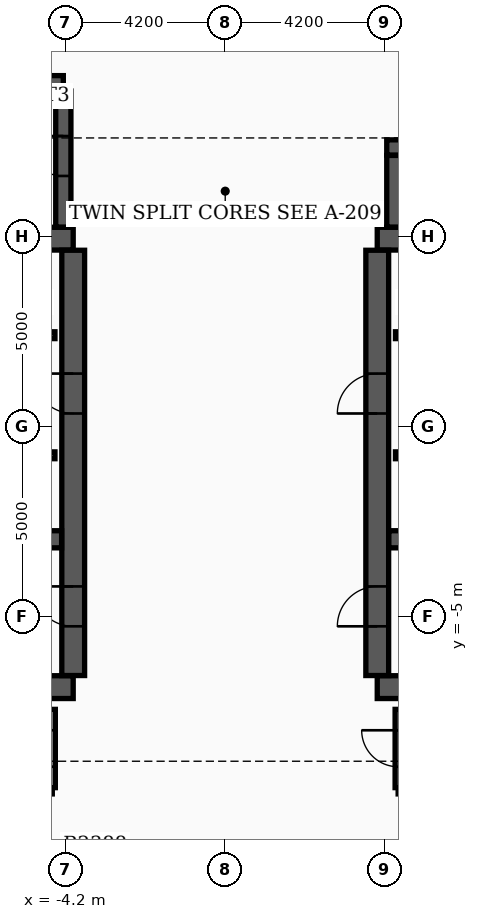
"""IFC4 building model, lengths in metres.
Left out: names, types, materials, properties, quantities, classifications, styles, units other than length and angle.
Written with IfcOpenShell. Run it as: python <this file> out.ifc"""

import sys

from ifc_helpers import new_model, si_unit, direction, frame, frame_2d, origin, place, context, subcontext, project, spatial, rectangle, extrude, element, fill, save


model = new_model("IFC4")
c1 = context("Model", 3, precision=1e-05, world=origin(), true_north=direction((0.0, 1.0)))
c2 = subcontext(c1, "Body", "Model", "MODEL_VIEW")
j1 = project(units=[si_unit("LENGTHUNIT", "METRE"), si_unit("PLANEANGLEUNIT", "RADIAN")], contexts=[c1])
p1 = place(None, origin())
s1 = spatial("IfcSite", under=j1, at=p1, CompositionType="ELEMENT")
p2 = place(p1, origin())
s2 = spatial("IfcBuilding", under=s1, at=p2, CompositionType="ELEMENT")
p3 = place(p2, frame((0.0, 0.0, 152.7)))
s3 = spatial("IfcBuildingStorey", under=s2, at=p3, CompositionType="ELEMENT", Elevation=152.7)
for number, where, z_axis, x_axis in (
    (1, (-12.4, -6.85, 0.0), (0.0, 0.0, 1.0), (1.0, 0.0, 0.0)),
    (2, (-12.4, 4.95, 0.0), (0.0, 0.0, 1.0), (1.0, 0.0, 0.0)),
):
    element("IfcWall", number, at=place(p3, frame(where, z_axis=z_axis, x_axis=x_axis)), inside=s3, PredefinedType="SHEAR", context=c2, shape_type="SweptSolid", body=[
        extrude(rectangle(XDim=8.4, YDim=0.6, at=frame_2d((4.2, 0.0))), origin(), (0.0, 0.0, 1.0), 3.7),
    ])
p4 = place(p3, frame((-4.0, -6.545, 0.0), z_axis=(0.0, 0.0, 1.0), x_axis=(0.0, 1.0, 0.0)))
e3 = element("IfcWall", 3, at=p4, inside=s3, PredefinedType="SHEAR", context=c2, shape_type="SweptSolid", body=[
    extrude(rectangle(XDim=11.19, YDim=0.6, at=frame_2d((5.595, 0.0))), origin(), (0.0, 0.0, 1.0), 3.7),
])
p5 = place(p4, frame((1.295, 0.0, 0.0)))
e4 = element("IfcOpeningElement", 4, at=p5, cuts=e3, PredefinedType="OPENING", context=c2, shape_type="SweptSolid", body=[
    extrude(rectangle(XDim=1.05, YDim=2.15, at=frame_2d((0.525, 1.075))), frame((0.0, 0.31, 0.0), z_axis=(0.0, -1.0, 0.0), x_axis=(1.0, 0.0, 0.0)), (0.0, 0.0, 1.0), 0.62),
])
p6 = place(p4, frame((6.895, 0.0, 0.0)))
e5 = element("IfcOpeningElement", 5, at=p6, cuts=e3, PredefinedType="OPENING", context=c2, shape_type="SweptSolid", body=[
    extrude(rectangle(XDim=1.05, YDim=2.15, at=frame_2d((0.525, 1.075))), frame((0.0, 0.31, 0.0), z_axis=(0.0, -1.0, 0.0), x_axis=(1.0, 0.0, 0.0)), (0.0, 0.0, 1.0), 0.62),
])
p7 = place(p3, frame((-12.095, -2.96, 0.0), z_axis=(0.0, 0.0, 1.0), x_axis=(1.0, 0.0, 0.0)))
e6 = element("IfcWall", 6, at=p7, inside=s3, PredefinedType="SHEAR", context=c2, shape_type="SweptSolid", body=[
    extrude(rectangle(XDim=7.79, YDim=0.45, at=frame_2d((3.895, 0.0))), origin(), (0.0, 0.0, 1.0), 3.7),
])
for number, where, z_axis, x_axis in (
    (7, (4.0, -6.85, 0.0), (0.0, 0.0, 1.0), (1.0, 0.0, 0.0)),
    (8, (4.0, 4.95, 0.0), (0.0, 0.0, 1.0), (1.0, 0.0, 0.0)),
):
    element("IfcWall", number, at=place(p3, frame(where, z_axis=z_axis, x_axis=x_axis)), inside=s3, PredefinedType="SHEAR", context=c2, shape_type="SweptSolid", body=[
        extrude(rectangle(XDim=8.4, YDim=0.6, at=frame_2d((4.2, 0.0))), origin(), (0.0, 0.0, 1.0), 3.7),
    ])
p8 = place(p3, frame((4.0, -6.545, 0.0), z_axis=(0.0, 0.0, 1.0), x_axis=(0.0, 1.0, 0.0)))
e9 = element("IfcWall", 9, at=p8, inside=s3, PredefinedType="SHEAR", context=c2, shape_type="SweptSolid", body=[
    extrude(rectangle(XDim=11.19, YDim=0.6, at=frame_2d((5.595, 0.0))), origin(), (0.0, 0.0, 1.0), 3.7),
])
p9 = place(p8, frame((1.295, 0.0, 0.0)))
e10 = element("IfcOpeningElement", 10, at=p9, cuts=e9, PredefinedType="OPENING", context=c2, shape_type="SweptSolid", body=[
    extrude(rectangle(XDim=1.05, YDim=2.15, at=frame_2d((0.525, 1.075))), frame((0.0, 0.31, 0.0), z_axis=(0.0, -1.0, 0.0), x_axis=(1.0, 0.0, 0.0)), (0.0, 0.0, 1.0), 0.62),
])
p10 = place(p8, frame((6.895, 0.0, 0.0)))
e11 = element("IfcOpeningElement", 11, at=p10, cuts=e9, PredefinedType="OPENING", context=c2, shape_type="SweptSolid", body=[
    extrude(rectangle(XDim=1.05, YDim=2.15, at=frame_2d((0.525, 1.075))), frame((0.0, 0.31, 0.0), z_axis=(0.0, -1.0, 0.0), x_axis=(1.0, 0.0, 0.0)), (0.0, 0.0, 1.0), 0.62),
])
p11 = place(p3, frame((4.305, -2.96, 0.0), z_axis=(0.0, 0.0, 1.0), x_axis=(1.0, 0.0, 0.0)))
e12 = element("IfcWall", 12, at=p11, inside=s3, PredefinedType="SHEAR", context=c2, shape_type="SweptSolid", body=[
    extrude(rectangle(XDim=7.79, YDim=0.45, at=frame_2d((3.895, 0.0))), origin(), (0.0, 0.0, 1.0), 3.7),
])
p12 = place(p3, frame((-12.22, 9.04, 0.0), z_axis=(0.0, 0.0, 1.0), x_axis=(1.0, 0.0, 0.0)))
e13 = element("IfcWall", 13, at=p12, inside=s3, PredefinedType="SHEAR", context=c2, shape_type="SweptSolid", body=[
    extrude(rectangle(XDim=7.96, YDim=0.4, at=frame_2d((3.98, 0.0))), origin(), (0.0, 0.0, 1.0), 3.7),
])
p13 = place(p3, frame((-4.26, 5.255, 0.0), z_axis=(0.0, 0.0, 1.0), x_axis=(0.0, 1.0, 0.0)))
e14 = element("IfcWall", 14, at=p13, inside=s3, PredefinedType="SHEAR", context=c2, shape_type="SweptSolid", body=[
    extrude(rectangle(XDim=3.58, YDim=0.4, at=frame_2d((1.79, 0.0))), origin(), (0.0, 0.0, 1.0), 3.7),
])
p14 = place(p13, frame((1.345, 0.0, 0.0)))
e15 = element("IfcOpeningElement", 15, at=p14, cuts=e14, PredefinedType="OPENING", context=c2, shape_type="SweptSolid", body=[
    extrude(rectangle(XDim=1.05, YDim=2.15, at=frame_2d((0.525, 1.075))), frame((0.0, 0.21, 0.0), z_axis=(0.0, -1.0, 0.0), x_axis=(1.0, 0.0, 0.0)), (0.0, 0.0, 1.0), 0.42),
])
p15 = place(p3, frame((4.45, 5.255, 0.0), z_axis=(0.0, 0.0, 1.0), x_axis=(0.0, 1.0, 0.0)))
e16 = element("IfcWall", 16, at=p15, inside=s3, PredefinedType="SHEAR", context=c2, shape_type="SweptSolid", body=[
    extrude(rectangle(XDim=1.885, YDim=0.4, at=frame_2d((0.942, 0.0))), origin(), (0.0, 0.0, 1.0), 3.7),
])
p16 = place(p3, frame((4.25, 7.35, 0.0), z_axis=(0.0, 0.0, 1.0), x_axis=(1.0, 0.0, 0.0)))
e17 = element("IfcWall", 17, at=p16, inside=s3, PredefinedType="SHEAR", context=c2, shape_type="SweptSolid", body=[
    extrude(rectangle(XDim=5.4, YDim=0.4, at=frame_2d((2.7, 0.0))), origin(), (0.0, 0.0, 1.0), 3.7),
])
p17 = place(p3, frame((-11.9, 2.41, 0.0), z_axis=(0.0, 0.0, 1.0), x_axis=(1.0, 0.0, 0.0)))
e18 = element("IfcWall", 18, at=p17, inside=s3, PredefinedType="SOLIDWALL", context=c2, shape_type="SweptSolid", body=[
    extrude(rectangle(XDim=7.42, YDim=0.18, at=frame_2d((3.71, 0.0))), origin(), (0.0, 0.0, 1.0), 2.96),
])
p18 = place(p17, frame((0.55, 0.0, 0.0)))
e19 = element("IfcOpeningElement", 19, at=p18, cuts=e18, PredefinedType="OPENING", context=c2, shape_type="SweptSolid", body=[
    extrude(rectangle(XDim=1.1, YDim=2.15, at=frame_2d((0.55, 1.075))), frame((0.0, 0.1, 0.0), z_axis=(0.0, -1.0, 0.0), x_axis=(1.0, 0.0, 0.0)), (0.0, 0.0, 1.0), 0.2),
])
p19 = place(p17, frame((4.9, 0.0, 0.0)))
e20 = element("IfcOpeningElement", 20, at=p19, cuts=e18, PredefinedType="OPENING", context=c2, shape_type="SweptSolid", body=[
    extrude(rectangle(XDim=0.88, YDim=2.1, at=frame_2d((0.44, 1.05))), frame((0.0, 0.1, 0.0), z_axis=(0.0, -1.0, 0.0), x_axis=(1.0, 0.0, 0.0)), (0.0, 0.0, 1.0), 0.2),
])
p20 = place(p3, frame((4.48, 2.41, 0.0), z_axis=(0.0, 0.0, 1.0), x_axis=(1.0, 0.0, 0.0)))
e21 = element("IfcWall", 21, at=p20, inside=s3, PredefinedType="SOLIDWALL", context=c2, shape_type="SweptSolid", body=[
    extrude(rectangle(XDim=7.42, YDim=0.18, at=frame_2d((3.71, 0.0))), origin(), (0.0, 0.0, 1.0), 2.96),
])
p21 = place(p20, frame((5.67, 0.0, 0.0)))
e22 = element("IfcOpeningElement", 22, at=p21, cuts=e21, PredefinedType="OPENING", context=c2, shape_type="SweptSolid", body=[
    extrude(rectangle(XDim=1.1, YDim=2.15, at=frame_2d((0.55, 1.075))), frame((0.0, 0.1, 0.0), z_axis=(0.0, -1.0, 0.0), x_axis=(1.0, 0.0, 0.0)), (0.0, 0.0, 1.0), 0.2),
])
p22 = place(p20, frame((1.6, 0.0, 0.0)))
e23 = element("IfcOpeningElement", 23, at=p22, cuts=e21, PredefinedType="OPENING", context=c2, shape_type="SweptSolid", body=[
    extrude(rectangle(XDim=0.88, YDim=2.1, at=frame_2d((0.44, 1.05))), frame((0.0, 0.1, 0.0), z_axis=(0.0, -1.0, 0.0), x_axis=(1.0, 0.0, 0.0)), (0.0, 0.0, 1.0), 0.2),
])
p23 = place(p3, frame((-11.9, -0.75, 0.0), z_axis=(0.0, 0.0, 1.0), x_axis=(1.0, 0.0, 0.0)))
e24 = element("IfcWall", 24, at=p23, inside=s3, PredefinedType="SOLIDWALL", context=c2, shape_type="SweptSolid", body=[
    extrude(rectangle(XDim=7.42, YDim=0.18, at=frame_2d((3.71, 0.0))), origin(), (0.0, 0.0, 1.0), 2.96),
])
p24 = place(p23, frame((0.45, 0.0, 0.0)))
e25 = element("IfcOpeningElement", 25, at=p24, cuts=e24, PredefinedType="OPENING", context=c2, shape_type="SweptSolid", body=[
    extrude(rectangle(XDim=1.1, YDim=2.15, at=frame_2d((0.55, 1.075))), frame((0.0, 0.1, 0.0), z_axis=(0.0, -1.0, 0.0), x_axis=(1.0, 0.0, 0.0)), (0.0, 0.0, 1.0), 0.2),
])
p25 = place(p23, frame((2.35, 0.0, 0.0)))
e26 = element("IfcOpeningElement", 26, at=p25, cuts=e24, PredefinedType="OPENING", context=c2, shape_type="SweptSolid", body=[
    extrude(rectangle(XDim=1.1, YDim=2.15, at=frame_2d((0.55, 1.075))), frame((0.0, 0.1, 0.0), z_axis=(0.0, -1.0, 0.0), x_axis=(1.0, 0.0, 0.0)), (0.0, 0.0, 1.0), 0.2),
])
p26 = place(p3, frame((4.48, -0.75, 0.0), z_axis=(0.0, 0.0, 1.0), x_axis=(1.0, 0.0, 0.0)))
e27 = element("IfcWall", 27, at=p26, inside=s3, PredefinedType="SOLIDWALL", context=c2, shape_type="SweptSolid", body=[
    extrude(rectangle(XDim=7.42, YDim=0.18, at=frame_2d((3.71, 0.0))), origin(), (0.0, 0.0, 1.0), 2.96),
])
p27 = place(p26, frame((0.52, 0.0, 0.0)))
e28 = element("IfcOpeningElement", 28, at=p27, cuts=e27, PredefinedType="OPENING", context=c2, shape_type="SweptSolid", body=[
    extrude(rectangle(XDim=1.1, YDim=2.15, at=frame_2d((0.55, 1.075))), frame((0.0, 0.1, 0.0), z_axis=(0.0, -1.0, 0.0), x_axis=(1.0, 0.0, 0.0)), (0.0, 0.0, 1.0), 0.2),
])
p28 = place(p3, frame((4.55, -9.58, 0.0), z_axis=(0.0, 0.0, 1.0), x_axis=(1.0, 0.0, 0.0)))
e29 = element("IfcWall", 29, at=p28, inside=s3, PredefinedType="PARTITIONING", context=c2, shape_type="SweptSolid", body=[
    extrude(rectangle(XDim=8.1, YDim=0.16, at=frame_2d((4.05, 0.0))), origin(), (0.0, 0.0, 1.0), 2.96),
])
p29 = place(p3, frame((4.55, -9.495, 0.0), z_axis=(0.0, 0.0, 1.0), x_axis=(0.0, 1.0, 0.0)))
e30 = element("IfcWall", 30, at=p29, inside=s3, PredefinedType="PARTITIONING", context=c2, shape_type="SweptSolid", body=[
    extrude(rectangle(XDim=2.06, YDim=0.16, at=frame_2d((1.03, 0.0))), origin(), (0.0, 0.0, 1.0), 2.96),
])
p30 = place(p29, frame((0.55, 0.0, 0.0)))
e31 = element("IfcOpeningElement", 31, at=p30, cuts=e30, PredefinedType="OPENING", context=c2, shape_type="SweptSolid", body=[
    extrude(rectangle(XDim=0.96, YDim=2.15, at=frame_2d((0.48, 1.075))), frame((0.0, 0.09, 0.0), z_axis=(0.0, -1.0, 0.0), x_axis=(1.0, 0.0, 0.0)), (0.0, 0.0, 1.0), 0.18),
])
p31 = place(p3, frame((-4.55, -9.495, 0.0), z_axis=(0.0, 0.0, 1.0), x_axis=(0.0, 1.0, 0.0)))
e32 = element("IfcWall", 32, at=p31, inside=s3, PredefinedType="PARTITIONING", context=c2, shape_type="SweptSolid", body=[
    extrude(rectangle(XDim=2.06, YDim=0.16, at=frame_2d((1.03, 0.0))), origin(), (0.0, 0.0, 1.0), 2.96),
])
p32 = place(p31, frame((0.55, 0.0, 0.0)))
e33 = element("IfcOpeningElement", 33, at=p32, cuts=e32, PredefinedType="OPENING", context=c2, shape_type="SweptSolid", body=[
    extrude(rectangle(XDim=0.96, YDim=2.15, at=frame_2d((0.48, 1.075))), frame((0.0, 0.09, 0.0), z_axis=(0.0, -1.0, 0.0), x_axis=(1.0, 0.0, 0.0)), (0.0, 0.0, 1.0), 0.18),
])
p33 = place(p5, origin())
e34 = element("IfcDoor", 34, at=p33, inside=s3, OperationType="SINGLE_SWING_RIGHT", PredefinedType="DOOR", context=c2, shape_type="SweptSolid", body=[
    extrude(rectangle(XDim=1.05, YDim=2.15, at=frame_2d((0.525, 1.075))), frame((0.0, 0.025, 0.0), z_axis=(0.0, -1.0, 0.0), x_axis=(1.0, 0.0, 0.0)), (0.0, 0.0, 1.0), 0.05),
])
fill(e4, e34)
p34 = place(p9, origin())
e35 = element("IfcDoor", 35, at=p34, inside=s3, OperationType="SINGLE_SWING_LEFT", PredefinedType="DOOR", context=c2, shape_type="SweptSolid", body=[
    extrude(rectangle(XDim=1.05, YDim=2.15, at=frame_2d((0.525, 1.075))), frame((0.0, 0.025, 0.0), z_axis=(0.0, -1.0, 0.0), x_axis=(1.0, 0.0, 0.0)), (0.0, 0.0, 1.0), 0.05),
])
fill(e10, e35)
p35 = place(p6, origin())
e36 = element("IfcDoor", 36, at=p35, inside=s3, OperationType="SINGLE_SWING_RIGHT", PredefinedType="DOOR", context=c2, shape_type="SweptSolid", body=[
    extrude(rectangle(XDim=1.05, YDim=2.15, at=frame_2d((0.525, 1.075))), frame((0.0, 0.025, 0.0), z_axis=(0.0, -1.0, 0.0), x_axis=(1.0, 0.0, 0.0)), (0.0, 0.0, 1.0), 0.05),
])
fill(e5, e36)
p36 = place(p10, origin())
e37 = element("IfcDoor", 37, at=p36, inside=s3, OperationType="SINGLE_SWING_LEFT", PredefinedType="DOOR", context=c2, shape_type="SweptSolid", body=[
    extrude(rectangle(XDim=1.05, YDim=2.15, at=frame_2d((0.525, 1.075))), frame((0.0, 0.025, 0.0), z_axis=(0.0, -1.0, 0.0), x_axis=(1.0, 0.0, 0.0)), (0.0, 0.0, 1.0), 0.05),
])
fill(e11, e37)
p37 = place(p14, origin())
e38 = element("IfcDoor", 38, at=p37, inside=s3, OperationType="SINGLE_SWING_RIGHT", PredefinedType="DOOR", context=c2, shape_type="SweptSolid", body=[
    extrude(rectangle(XDim=1.05, YDim=2.15, at=frame_2d((0.525, 1.075))), frame((0.0, 0.025, 0.0), z_axis=(0.0, -1.0, 0.0), x_axis=(1.0, 0.0, 0.0)), (0.0, 0.0, 1.0), 0.05),
])
fill(e15, e38)
p38 = place(p30, origin())
e39 = element("IfcDoor", 39, at=p38, inside=s3, OperationType="SINGLE_SWING_RIGHT", PredefinedType="DOOR", context=c2, shape_type="SweptSolid", body=[
    extrude(rectangle(XDim=0.96, YDim=2.15, at=frame_2d((0.48, 1.075))), frame((0.0, 0.025, 0.0), z_axis=(0.0, -1.0, 0.0), x_axis=(1.0, 0.0, 0.0)), (0.0, 0.0, 1.0), 0.05),
])
fill(e31, e39)
p39 = place(p32, origin())
e40 = element("IfcDoor", 40, at=p39, inside=s3, OperationType="SINGLE_SWING_LEFT", PredefinedType="DOOR", context=c2, shape_type="SweptSolid", body=[
    extrude(rectangle(XDim=0.96, YDim=2.15, at=frame_2d((0.48, 1.075))), frame((0.0, 0.025, 0.0), z_axis=(0.0, -1.0, 0.0), x_axis=(1.0, 0.0, 0.0)), (0.0, 0.0, 1.0), 0.05),
])
fill(e33, e40)
save(model, sys.argv[1])
